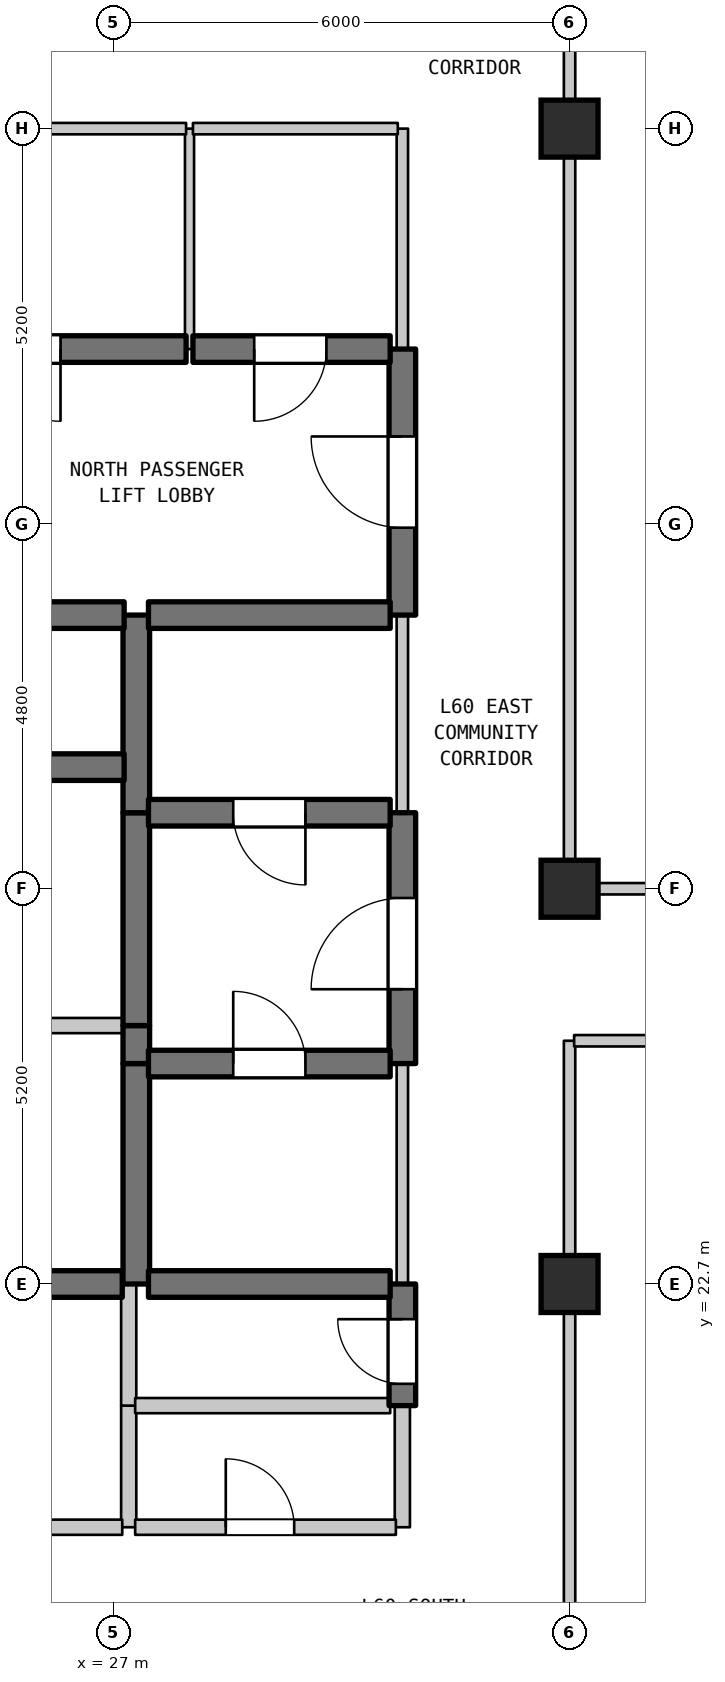
"""IFC4 building model, lengths in metres.
Left out: names, types, materials, properties, quantities, classifications, styles, units other than length and angle.
Written with IfcOpenShell. Run it as: python <this file> out.ifc"""

import sys

from ifc_helpers import new_model, si_unit, direction, frame, frame_2d, origin, origin_2d, place, context, subcontext, project, spatial, rectangle, extrude, element, fill, save


model = new_model("IFC4")
c1 = context("Model", 3, precision=1e-05, world=origin(), true_north=direction((0.0, 1.0)))
c2 = subcontext(c1, "Body", "Model", "MODEL_VIEW")
j1 = project(units=[si_unit("LENGTHUNIT", "METRE"), si_unit("PLANEANGLEUNIT", "RADIAN")], contexts=[c1])
p1 = place(None, origin())
s1 = spatial("IfcSite", under=j1, at=p1, CompositionType="ELEMENT")
p2 = place(p1, origin())
s2 = spatial("IfcBuilding", under=s1, at=p2, CompositionType="ELEMENT")
p3 = place(p2, frame((0.0, 0.0, 242.8)))
s3 = spatial("IfcBuildingStorey", under=s2, at=p3, CompositionType="ELEMENT", Elevation=242.8)
for number, where, z_axis, x_axis in (
    (1, (33.0, 22.7, 0.0), (0.0, 0.0, 1.0), (1.0, 0.0, 0.0)),
    (2, (33.0, 27.9, 0.0), (0.0, 0.0, 1.0), (1.0, 0.0, 0.0)),
    (3, (33.0, 37.9, 0.0), (0.0, 0.0, 1.0), (1.0, 0.0, 0.0)),
):
    element("IfcColumn", number, at=place(p3, frame(where, z_axis=z_axis, x_axis=x_axis)), inside=s3, PredefinedType="COLUMN", context=c2, shape_type="SweptSolid", body=[
        extrude(rectangle(XDim=0.75, YDim=0.75, at=origin_2d()), origin(), (0.0, 0.0, 1.0), 4.5),
    ])
p4 = place(p3, frame((27.2, 19.5, 0.0), z_axis=(0.0, 0.0, 1.0), x_axis=(0.0, 1.0, 0.0)))
e4 = element("IfcWall", 4, at=p4, inside=s3, PredefinedType="STANDARD", context=c2, shape_type="SweptSolid", body=[
    extrude(rectangle(XDim=1.6, YDim=0.2, at=frame_2d((0.8, 0.0))), origin(), (0.0, 0.0, 1.0), 4.19),
])
p5 = place(p3, frame((27.2, 21.1, 0.0), z_axis=(0.0, 0.0, 1.0), x_axis=(0.0, 1.0, 0.0)))
e5 = element("IfcWall", 5, at=p5, inside=s3, PredefinedType="STANDARD", context=c2, shape_type="SweptSolid", body=[
    extrude(rectangle(XDim=1.6, YDim=0.2, at=frame_2d((0.8, 0.0))), origin(), (0.0, 0.0, 1.0), 4.19),
])
p6 = place(p3, frame((27.3, 22.7, 0.0), z_axis=(0.0, 0.0, 1.0), x_axis=(0.0, 1.0, 0.0)))
e6 = element("IfcWall", 6, at=p6, inside=s3, PredefinedType="SHEAR", context=c2, shape_type="SweptSolid", body=[
    extrude(rectangle(XDim=2.9, YDim=0.35, at=frame_2d((1.45, 0.0))), origin(), (0.0, 0.0, 1.0), 4.19),
])
p7 = place(p3, frame((27.3, 25.6, 0.0), z_axis=(0.0, 0.0, 1.0), x_axis=(0.0, 1.0, 0.0)))
e7 = element("IfcWall", 7, at=p7, inside=s3, PredefinedType="SHEAR", context=c2, shape_type="SweptSolid", body=[
    extrude(rectangle(XDim=0.5, YDim=0.35, at=frame_2d((0.25, 0.0))), origin(), (0.0, 0.0, 1.0), 4.19),
])
p8 = place(p3, frame((27.3, 26.1, 0.0), z_axis=(0.0, 0.0, 1.0), x_axis=(0.0, 1.0, 0.0)))
e8 = element("IfcWall", 8, at=p8, inside=s3, PredefinedType="SHEAR", context=c2, shape_type="SweptSolid", body=[
    extrude(rectangle(XDim=2.8, YDim=0.35, at=frame_2d((1.4, 0.0))), origin(), (0.0, 0.0, 1.0), 4.19),
])
p9 = place(p3, frame((27.3, 28.9, 0.0), z_axis=(0.0, 0.0, 1.0), x_axis=(0.0, 1.0, 0.0)))
e9 = element("IfcWall", 9, at=p9, inside=s3, PredefinedType="SHEAR", context=c2, shape_type="SweptSolid", body=[
    extrude(rectangle(XDim=2.6, YDim=0.35, at=frame_2d((1.3, 0.0))), origin(), (0.0, 0.0, 1.0), 4.19),
])
p10 = place(p3, frame((28.0, 35.0, 0.0), z_axis=(0.0, 0.0, 1.0), x_axis=(0.0, 1.0, 0.0)))
e10 = element("IfcWall", 10, at=p10, inside=s3, PredefinedType="PARTITIONING", context=c2, shape_type="SweptSolid", body=[
    extrude(rectangle(XDim=2.9, YDim=0.12, at=frame_2d((1.45, 0.0))), origin(), (0.0, 0.0, 1.0), 4.19),
])
p11 = place(p3, frame((30.8, 19.5, 0.0), z_axis=(0.0, 0.0, 1.0), x_axis=(0.0, 1.0, 0.0)))
e11 = element("IfcWall", 11, at=p11, inside=s3, PredefinedType="STANDARD", context=c2, shape_type="SweptSolid", body=[
    extrude(rectangle(XDim=1.6, YDim=0.2, at=frame_2d((0.8, 0.0))), origin(), (0.0, 0.0, 1.0), 4.19),
])
p12 = place(p3, frame((30.8, 21.1, 0.0), z_axis=(0.0, 0.0, 1.0), x_axis=(0.0, 1.0, 0.0)))
e12 = element("IfcWall", 12, at=p12, inside=s3, PredefinedType="SHEAR", context=c2, shape_type="SweptSolid", body=[
    extrude(rectangle(XDim=1.6, YDim=0.35, at=frame_2d((0.8, 0.0))), origin(), (0.0, 0.0, 1.0), 4.19),
])
p13 = place(p12, frame((0.287, 0.0, 0.0)))
e13 = element("IfcOpeningElement", 13, at=p13, cuts=e12, PredefinedType="OPENING", context=c2, shape_type="SweptSolid", body=[
    extrude(rectangle(XDim=0.85, YDim=2.1, at=frame_2d((0.425, 1.05))), frame((0.0, 0.185, 0.0), z_axis=(0.0, -1.0, 0.0), x_axis=(1.0, 0.0, 0.0)), (0.0, 0.0, 1.0), 0.37),
])
p14 = place(p3, frame((30.8, 22.7, 0.0), z_axis=(0.0, 0.0, 1.0), x_axis=(0.0, 1.0, 0.0)))
e14 = element("IfcWall", 14, at=p14, inside=s3, PredefinedType="STANDARD", context=c2, shape_type="SweptSolid", body=[
    extrude(rectangle(XDim=2.9, YDim=0.15, at=frame_2d((1.45, 0.0))), origin(), (0.0, 0.0, 1.0), 4.19),
])
p15 = place(p3, frame((30.8, 25.6, 0.0), z_axis=(0.0, 0.0, 1.0), x_axis=(0.0, 1.0, 0.0)))
e15 = element("IfcWall", 15, at=p15, inside=s3, PredefinedType="SHEAR", context=c2, shape_type="SweptSolid", body=[
    extrude(rectangle(XDim=3.3, YDim=0.35, at=frame_2d((1.65, 0.0))), origin(), (0.0, 0.0, 1.0), 4.19),
])
p16 = place(p15, frame((0.978, 0.0, 0.0)))
e16 = element("IfcOpeningElement", 16, at=p16, cuts=e15, PredefinedType="OPENING", context=c2, shape_type="SweptSolid", body=[
    extrude(rectangle(XDim=1.2, YDim=2.2, at=frame_2d((0.6, 1.1))), frame((0.0, 0.185, 0.0), z_axis=(0.0, -1.0, 0.0), x_axis=(1.0, 0.0, 0.0)), (0.0, 0.0, 1.0), 0.37),
])
p17 = place(p3, frame((30.8, 28.9, 0.0), z_axis=(0.0, 0.0, 1.0), x_axis=(0.0, 1.0, 0.0)))
e17 = element("IfcWall", 17, at=p17, inside=s3, PredefinedType="STANDARD", context=c2, shape_type="SweptSolid", body=[
    extrude(rectangle(XDim=2.6, YDim=0.15, at=frame_2d((1.3, 0.0))), origin(), (0.0, 0.0, 1.0), 4.19),
])
p18 = place(p3, frame((30.8, 31.5, 0.0), z_axis=(0.0, 0.0, 1.0), x_axis=(0.0, 1.0, 0.0)))
e18 = element("IfcWall", 18, at=p18, inside=s3, PredefinedType="SHEAR", context=c2, shape_type="SweptSolid", body=[
    extrude(rectangle(XDim=3.5, YDim=0.35, at=frame_2d((1.75, 0.0))), origin(), (0.0, 0.0, 1.0), 4.19),
])
p19 = place(p18, frame((1.15, 0.0, 0.0)))
e19 = element("IfcOpeningElement", 19, at=p19, cuts=e18, PredefinedType="OPENING", context=c2, shape_type="SweptSolid", body=[
    extrude(rectangle(XDim=1.2, YDim=2.2, at=frame_2d((0.6, 1.1))), frame((0.0, 0.185, 0.0), z_axis=(0.0, -1.0, 0.0), x_axis=(1.0, 0.0, 0.0)), (0.0, 0.0, 1.0), 0.37),
])
p20 = place(p3, frame((30.8, 35.0, 0.0), z_axis=(0.0, 0.0, 1.0), x_axis=(0.0, 1.0, 0.0)))
e20 = element("IfcWall", 20, at=p20, inside=s3, PredefinedType="STANDARD", context=c2, shape_type="SweptSolid", body=[
    extrude(rectangle(XDim=2.9, YDim=0.15, at=frame_2d((1.45, 0.0))), origin(), (0.0, 0.0, 1.0), 4.19),
])
p21 = place(p3, frame((33.0, 6.71, 0.0), z_axis=(0.0, 0.0, 1.0), x_axis=(0.0, 1.0, 0.0)))
e21 = element("IfcWall", 21, at=p21, inside=s3, PredefinedType="STANDARD", context=c2, shape_type="SweptSolid", body=[
    extrude(rectangle(XDim=19.19, YDim=0.15, at=frame_2d((9.595, 0.0))), origin(), (0.0, 0.0, 1.0), 3.9),
])
p22 = place(p3, frame((33.0, 27.9, 0.0), z_axis=(0.0, 0.0, 1.0), x_axis=(0.0, 1.0, 0.0)))
e22 = element("IfcWall", 22, at=p22, inside=s3, PredefinedType="STANDARD", context=c2, shape_type="SweptSolid", body=[
    extrude(rectangle(XDim=10.0, YDim=0.15, at=frame_2d((5.0, 0.0))), origin(), (0.0, 0.0, 1.0), 3.69),
])
p23 = place(p3, frame((23.96, 19.5, 0.0), z_axis=(0.0, 0.0, 1.0), x_axis=(1.0, 0.0, 0.0)))
e23 = element("IfcWall", 23, at=p23, inside=s3, PredefinedType="STANDARD", context=c2, shape_type="SweptSolid", body=[
    extrude(rectangle(XDim=3.155, YDim=0.2, at=frame_2d((1.578, 0.0))), origin(), (0.0, 0.0, 1.0), 4.19),
])
p24 = place(p23, frame((0.991, 0.0, 0.0)))
e24 = element("IfcOpeningElement", 24, at=p24, cuts=e23, PredefinedType="OPENING", context=c2, shape_type="SweptSolid", body=[
    extrude(rectangle(XDim=0.95, YDim=2.15, at=frame_2d((0.475, 1.075))), frame((0.0, 0.11, 0.0), z_axis=(0.0, -1.0, 0.0), x_axis=(1.0, 0.0, 0.0)), (0.0, 0.0, 1.0), 0.22),
])
p25 = place(p3, frame((27.285, 19.5, 0.0), z_axis=(0.0, 0.0, 1.0), x_axis=(1.0, 0.0, 0.0)))
e25 = element("IfcWall", 25, at=p25, inside=s3, PredefinedType="STANDARD", context=c2, shape_type="SweptSolid", body=[
    extrude(rectangle(XDim=3.43, YDim=0.2, at=frame_2d((1.715, 0.0))), origin(), (0.0, 0.0, 1.0), 4.19),
])
p26 = place(p25, frame((1.192, 0.0, 0.0)))
e26 = element("IfcOpeningElement", 26, at=p26, cuts=e25, PredefinedType="OPENING", context=c2, shape_type="SweptSolid", body=[
    extrude(rectangle(XDim=0.9, YDim=2.15, at=frame_2d((0.45, 1.075))), frame((0.0, 0.11, 0.0), z_axis=(0.0, -1.0, 0.0), x_axis=(1.0, 0.0, 0.0)), (0.0, 0.0, 1.0), 0.22),
])
p27 = place(p3, frame((27.285, 21.1, 0.0), z_axis=(0.0, 0.0, 1.0), x_axis=(1.0, 0.0, 0.0)))
e27 = element("IfcWall", 27, at=p27, inside=s3, PredefinedType="STANDARD", context=c2, shape_type="SweptSolid", body=[
    extrude(rectangle(XDim=3.355, YDim=0.2, at=frame_2d((1.677, 0.0))), origin(), (0.0, 0.0, 1.0), 4.19),
])
p28 = place(p3, frame((23.96, 22.7, 0.0), z_axis=(0.0, 0.0, 1.0), x_axis=(1.0, 0.0, 0.0)))
e28 = element("IfcWall", 28, at=p28, inside=s3, PredefinedType="SHEAR", context=c2, shape_type="SweptSolid", body=[
    extrude(rectangle(XDim=3.155, YDim=0.35, at=frame_2d((1.578, 0.0))), origin(), (0.0, 0.0, 1.0), 4.19),
])
p29 = place(p3, frame((27.46, 22.7, 0.0), z_axis=(0.0, 0.0, 1.0), x_axis=(1.0, 0.0, 0.0)))
e29 = element("IfcWall", 29, at=p29, inside=s3, PredefinedType="SHEAR", context=c2, shape_type="SweptSolid", body=[
    extrude(rectangle(XDim=3.18, YDim=0.35, at=frame_2d((1.59, 0.0))), origin(), (0.0, 0.0, 1.0), 4.19),
])
p30 = place(p3, frame((27.46, 25.6, 0.0), z_axis=(0.0, 0.0, 1.0), x_axis=(1.0, 0.0, 0.0)))
e30 = element("IfcWall", 30, at=p30, inside=s3, PredefinedType="SHEAR", context=c2, shape_type="SweptSolid", body=[
    extrude(rectangle(XDim=3.18, YDim=0.35, at=frame_2d((1.59, 0.0))), origin(), (0.0, 0.0, 1.0), 4.19),
])
p31 = place(p30, frame((1.115, 0.0, 0.0)))
e31 = element("IfcOpeningElement", 31, at=p31, cuts=e30, PredefinedType="OPENING", context=c2, shape_type="SweptSolid", body=[
    extrude(rectangle(XDim=0.95, YDim=2.15, at=frame_2d((0.475, 1.075))), frame((0.0, 0.185, 0.0), z_axis=(0.0, -1.0, 0.0), x_axis=(1.0, 0.0, 0.0)), (0.0, 0.0, 1.0), 0.37),
])
p32 = place(p3, frame((33.06, 25.9, 0.0), z_axis=(0.0, 0.0, 1.0), x_axis=(1.0, 0.0, 0.0)))
e32 = element("IfcWall", 32, at=p32, inside=s3, PredefinedType="STANDARD", context=c2, shape_type="SweptSolid", body=[
    extrude(rectangle(XDim=11.647, YDim=0.15, at=frame_2d((5.823, 0.0))), origin(), (0.0, 0.0, 1.0), 4.19),
])
p33 = place(p32, frame((6.219, 0.0, 0.0)))
e33 = element("IfcOpeningElement", 33, at=p33, cuts=e32, PredefinedType="OPENING", context=c2, shape_type="SweptSolid", body=[
    extrude(rectangle(XDim=1.0, YDim=2.15, at=frame_2d((0.5, 1.075))), frame((0.0, 0.085, 0.0), z_axis=(0.0, -1.0, 0.0), x_axis=(1.0, 0.0, 0.0)), (0.0, 0.0, 1.0), 0.17),
])
p34 = place(p3, frame((23.96, 26.1, 0.0), z_axis=(0.0, 0.0, 1.0), x_axis=(1.0, 0.0, 0.0)))
e34 = element("IfcWall", 34, at=p34, inside=s3, PredefinedType="STANDARD", context=c2, shape_type="SweptSolid", body=[
    extrude(rectangle(XDim=3.18, YDim=0.2, at=frame_2d((1.59, 0.0))), origin(), (0.0, 0.0, 1.0), 4.19),
])
p35 = place(p3, frame((33.06, 27.9, 0.0), z_axis=(0.0, 0.0, 1.0), x_axis=(1.0, 0.0, 0.0)))
e35 = element("IfcWall", 35, at=p35, inside=s3, PredefinedType="STANDARD", context=c2, shape_type="SweptSolid", body=[
    extrude(rectangle(XDim=11.862, YDim=0.15, at=frame_2d((5.931, 0.0))), origin(), (0.0, 0.0, 1.0), 3.69),
])
p36 = place(p35, frame((6.155, 0.0, 0.0)))
e36 = element("IfcOpeningElement", 36, at=p36, cuts=e35, PredefinedType="OPENING", context=c2, shape_type="SweptSolid", body=[
    extrude(rectangle(XDim=1.2, YDim=2.2, at=frame_2d((0.6, 1.1))), frame((0.0, 0.085, 0.0), z_axis=(0.0, -1.0, 0.0), x_axis=(1.0, 0.0, 0.0)), (0.0, 0.0, 1.0), 0.17),
])
p37 = place(p3, frame((27.46, 28.9, 0.0), z_axis=(0.0, 0.0, 1.0), x_axis=(1.0, 0.0, 0.0)))
e37 = element("IfcWall", 37, at=p37, inside=s3, PredefinedType="SHEAR", context=c2, shape_type="SweptSolid", body=[
    extrude(rectangle(XDim=3.18, YDim=0.35, at=frame_2d((1.59, 0.0))), origin(), (0.0, 0.0, 1.0), 4.19),
])
p38 = place(p37, frame((1.115, 0.0, 0.0)))
e38 = element("IfcOpeningElement", 38, at=p38, cuts=e37, PredefinedType="OPENING", context=c2, shape_type="SweptSolid", body=[
    extrude(rectangle(XDim=0.95, YDim=2.15, at=frame_2d((0.475, 1.075))), frame((0.0, 0.185, 0.0), z_axis=(0.0, -1.0, 0.0), x_axis=(1.0, 0.0, 0.0)), (0.0, 0.0, 1.0), 0.37),
])
p39 = place(p3, frame((23.96, 29.5, 0.0), z_axis=(0.0, 0.0, 1.0), x_axis=(1.0, 0.0, 0.0)))
e39 = element("IfcWall", 39, at=p39, inside=s3, PredefinedType="SHEAR", context=c2, shape_type="SweptSolid", body=[
    extrude(rectangle(XDim=3.18, YDim=0.35, at=frame_2d((1.59, 0.0))), origin(), (0.0, 0.0, 1.0), 4.19),
])
p40 = place(p3, frame((23.96, 31.5, 0.0), z_axis=(0.0, 0.0, 1.0), x_axis=(1.0, 0.0, 0.0)))
e40 = element("IfcWall", 40, at=p40, inside=s3, PredefinedType="SHEAR", context=c2, shape_type="SweptSolid", body=[
    extrude(rectangle(XDim=3.18, YDim=0.35, at=frame_2d((1.59, 0.0))), origin(), (0.0, 0.0, 1.0), 4.19),
])
p41 = place(p40, frame((1.094, 0.0, 0.0)))
e41 = element("IfcOpeningElement", 41, at=p41, cuts=e40, PredefinedType="OPENING", context=c2, shape_type="SweptSolid", body=[
    extrude(rectangle(XDim=0.85, YDim=2.1, at=frame_2d((0.425, 1.05))), frame((0.0, 0.185, 0.0), z_axis=(0.0, -1.0, 0.0), x_axis=(1.0, 0.0, 0.0)), (0.0, 0.0, 1.0), 0.37),
])
p42 = place(p3, frame((27.46, 31.5, 0.0), z_axis=(0.0, 0.0, 1.0), x_axis=(1.0, 0.0, 0.0)))
e42 = element("IfcWall", 42, at=p42, inside=s3, PredefinedType="SHEAR", context=c2, shape_type="SweptSolid", body=[
    extrude(rectangle(XDim=3.18, YDim=0.35, at=frame_2d((1.59, 0.0))), origin(), (0.0, 0.0, 1.0), 4.19),
])
p43 = place(p3, frame((23.96, 35.0, 0.0), z_axis=(0.0, 0.0, 1.0), x_axis=(1.0, 0.0, 0.0)))
e43 = element("IfcWall", 43, at=p43, inside=s3, PredefinedType="SHEAR", context=c2, shape_type="SweptSolid", body=[
    extrude(rectangle(XDim=3.995, YDim=0.35, at=frame_2d((1.998, 0.0))), origin(), (0.0, 0.0, 1.0), 4.19),
])
p44 = place(p43, frame((1.393, 0.0, 0.0)))
e44 = element("IfcOpeningElement", 44, at=p44, cuts=e43, PredefinedType="OPENING", context=c2, shape_type="SweptSolid", body=[
    extrude(rectangle(XDim=0.95, YDim=2.15, at=frame_2d((0.475, 1.075))), frame((0.0, 0.185, 0.0), z_axis=(0.0, -1.0, 0.0), x_axis=(1.0, 0.0, 0.0)), (0.0, 0.0, 1.0), 0.37),
])
p45 = place(p3, frame((28.045, 35.0, 0.0), z_axis=(0.0, 0.0, 1.0), x_axis=(1.0, 0.0, 0.0)))
e45 = element("IfcWall", 45, at=p45, inside=s3, PredefinedType="SHEAR", context=c2, shape_type="SweptSolid", body=[
    extrude(rectangle(XDim=2.595, YDim=0.35, at=frame_2d((1.297, 0.0))), origin(), (0.0, 0.0, 1.0), 4.19),
])
p46 = place(p45, frame((0.806, 0.0, 0.0)))
e46 = element("IfcOpeningElement", 46, at=p46, cuts=e45, PredefinedType="OPENING", context=c2, shape_type="SweptSolid", body=[
    extrude(rectangle(XDim=0.95, YDim=2.15, at=frame_2d((0.475, 1.075))), frame((0.0, 0.185, 0.0), z_axis=(0.0, -1.0, 0.0), x_axis=(1.0, 0.0, 0.0)), (0.0, 0.0, 1.0), 0.37),
])
p47 = place(p3, frame((23.96, 37.9, 0.0), z_axis=(0.0, 0.0, 1.0), x_axis=(1.0, 0.0, 0.0)))
e47 = element("IfcWall", 47, at=p47, inside=s3, PredefinedType="STANDARD", context=c2, shape_type="SweptSolid", body=[
    extrude(rectangle(XDim=3.995, YDim=0.15, at=frame_2d((1.998, 0.0))), origin(), (0.0, 0.0, 1.0), 3.69),
])
p48 = place(p3, frame((28.045, 37.9, 0.0), z_axis=(0.0, 0.0, 1.0), x_axis=(1.0, 0.0, 0.0)))
e48 = element("IfcWall", 48, at=p48, inside=s3, PredefinedType="STANDARD", context=c2, shape_type="SweptSolid", body=[
    extrude(rectangle(XDim=2.695, YDim=0.15, at=frame_2d((1.348, 0.0))), origin(), (0.0, 0.0, 1.0), 3.69),
])
p49 = place(p3, frame((33.0, 37.9, 0.0), z_axis=(0.0, 0.0, 1.0), x_axis=(0.0, 1.0, 0.0)))
e49 = element("IfcWall", 49, at=p49, inside=s3, PredefinedType="STANDARD", context=c2, shape_type="SweptSolid", body=[
    extrude(rectangle(XDim=2.4, YDim=0.15, at=frame_2d((1.2, 0.0))), origin(), (0.0, 0.0, 1.0), 3.59),
])
p50 = place(p13, origin())
e50 = element("IfcDoor", 50, at=p50, inside=s3, OperationType="SINGLE_SWING_RIGHT", PredefinedType="DOOR", context=c2, shape_type="SweptSolid", body=[
    extrude(rectangle(XDim=0.85, YDim=2.1, at=frame_2d((0.425, 1.05))), frame((0.0, 0.025, 0.0), z_axis=(0.0, -1.0, 0.0), x_axis=(1.0, 0.0, 0.0)), (0.0, 0.0, 1.0), 0.05),
])
fill(e13, e50)
p51 = place(p16, origin())
e51 = element("IfcDoor", 51, at=p51, inside=s3, OperationType="SINGLE_SWING_LEFT", PredefinedType="DOOR", context=c2, shape_type="SweptSolid", body=[
    extrude(rectangle(XDim=1.2, YDim=2.2, at=frame_2d((0.6, 1.1))), frame((0.0, 0.025, 0.0), z_axis=(0.0, -1.0, 0.0), x_axis=(1.0, 0.0, 0.0)), (0.0, 0.0, 1.0), 0.05),
])
fill(e16, e51)
p52 = place(p19, origin())
e52 = element("IfcDoor", 52, at=p52, inside=s3, OperationType="SINGLE_SWING_RIGHT", PredefinedType="DOOR", context=c2, shape_type="SweptSolid", body=[
    extrude(rectangle(XDim=1.2, YDim=2.2, at=frame_2d((0.6, 1.1))), frame((0.0, 0.025, 0.0), z_axis=(0.0, -1.0, 0.0), x_axis=(1.0, 0.0, 0.0)), (0.0, 0.0, 1.0), 0.05),
])
fill(e19, e52)
p53 = place(p26, origin())
e53 = element("IfcDoor", 53, at=p53, inside=s3, OperationType="SINGLE_SWING_LEFT", PredefinedType="DOOR", context=c2, shape_type="SweptSolid", body=[
    extrude(rectangle(XDim=0.9, YDim=2.15, at=frame_2d((0.45, 1.075))), frame((0.0, 0.025, 0.0), z_axis=(0.0, -1.0, 0.0), x_axis=(1.0, 0.0, 0.0)), (0.0, 0.0, 1.0), 0.05),
])
fill(e26, e53)
p54 = place(p31, origin())
e54 = element("IfcDoor", 54, at=p54, inside=s3, OperationType="SINGLE_SWING_LEFT", PredefinedType="DOOR", context=c2, shape_type="SweptSolid", body=[
    extrude(rectangle(XDim=0.95, YDim=2.15, at=frame_2d((0.475, 1.075))), frame((0.0, 0.025, 0.0), z_axis=(0.0, -1.0, 0.0), x_axis=(1.0, 0.0, 0.0)), (0.0, 0.0, 1.0), 0.05),
])
fill(e31, e54)
p55 = place(p38, frame((0.95, 0.0, 0.0), z_axis=(0.0, 0.0, 1.0), x_axis=(-1.0, 0.0, 0.0)))
e55 = element("IfcDoor", 55, at=p55, inside=s3, OperationType="SINGLE_SWING_RIGHT", PredefinedType="DOOR", context=c2, shape_type="SweptSolid", body=[
    extrude(rectangle(XDim=0.95, YDim=2.15, at=frame_2d((0.475, 1.075))), frame((0.0, 0.025, 0.0), z_axis=(0.0, -1.0, 0.0), x_axis=(1.0, 0.0, 0.0)), (0.0, 0.0, 1.0), 0.05),
])
fill(e38, e55)
p56 = place(p44, frame((0.95, 0.0, 0.0), z_axis=(0.0, 0.0, 1.0), x_axis=(-1.0, 0.0, 0.0)))
e56 = element("IfcDoor", 56, at=p56, inside=s3, OperationType="SINGLE_SWING_RIGHT", PredefinedType="DOOR", context=c2, shape_type="SweptSolid", body=[
    extrude(rectangle(XDim=0.95, YDim=2.15, at=frame_2d((0.475, 1.075))), frame((0.0, 0.025, 0.0), z_axis=(0.0, -1.0, 0.0), x_axis=(1.0, 0.0, 0.0)), (0.0, 0.0, 1.0), 0.05),
])
fill(e44, e56)
p57 = place(p46, frame((0.95, 0.0, 0.0), z_axis=(0.0, 0.0, 1.0), x_axis=(-1.0, 0.0, 0.0)))
e57 = element("IfcDoor", 57, at=p57, inside=s3, OperationType="SINGLE_SWING_LEFT", PredefinedType="DOOR", context=c2, shape_type="SweptSolid", body=[
    extrude(rectangle(XDim=0.95, YDim=2.15, at=frame_2d((0.475, 1.075))), frame((0.0, 0.025, 0.0), z_axis=(0.0, -1.0, 0.0), x_axis=(1.0, 0.0, 0.0)), (0.0, 0.0, 1.0), 0.05),
])
fill(e46, e57)
save(model, sys.argv[1])
